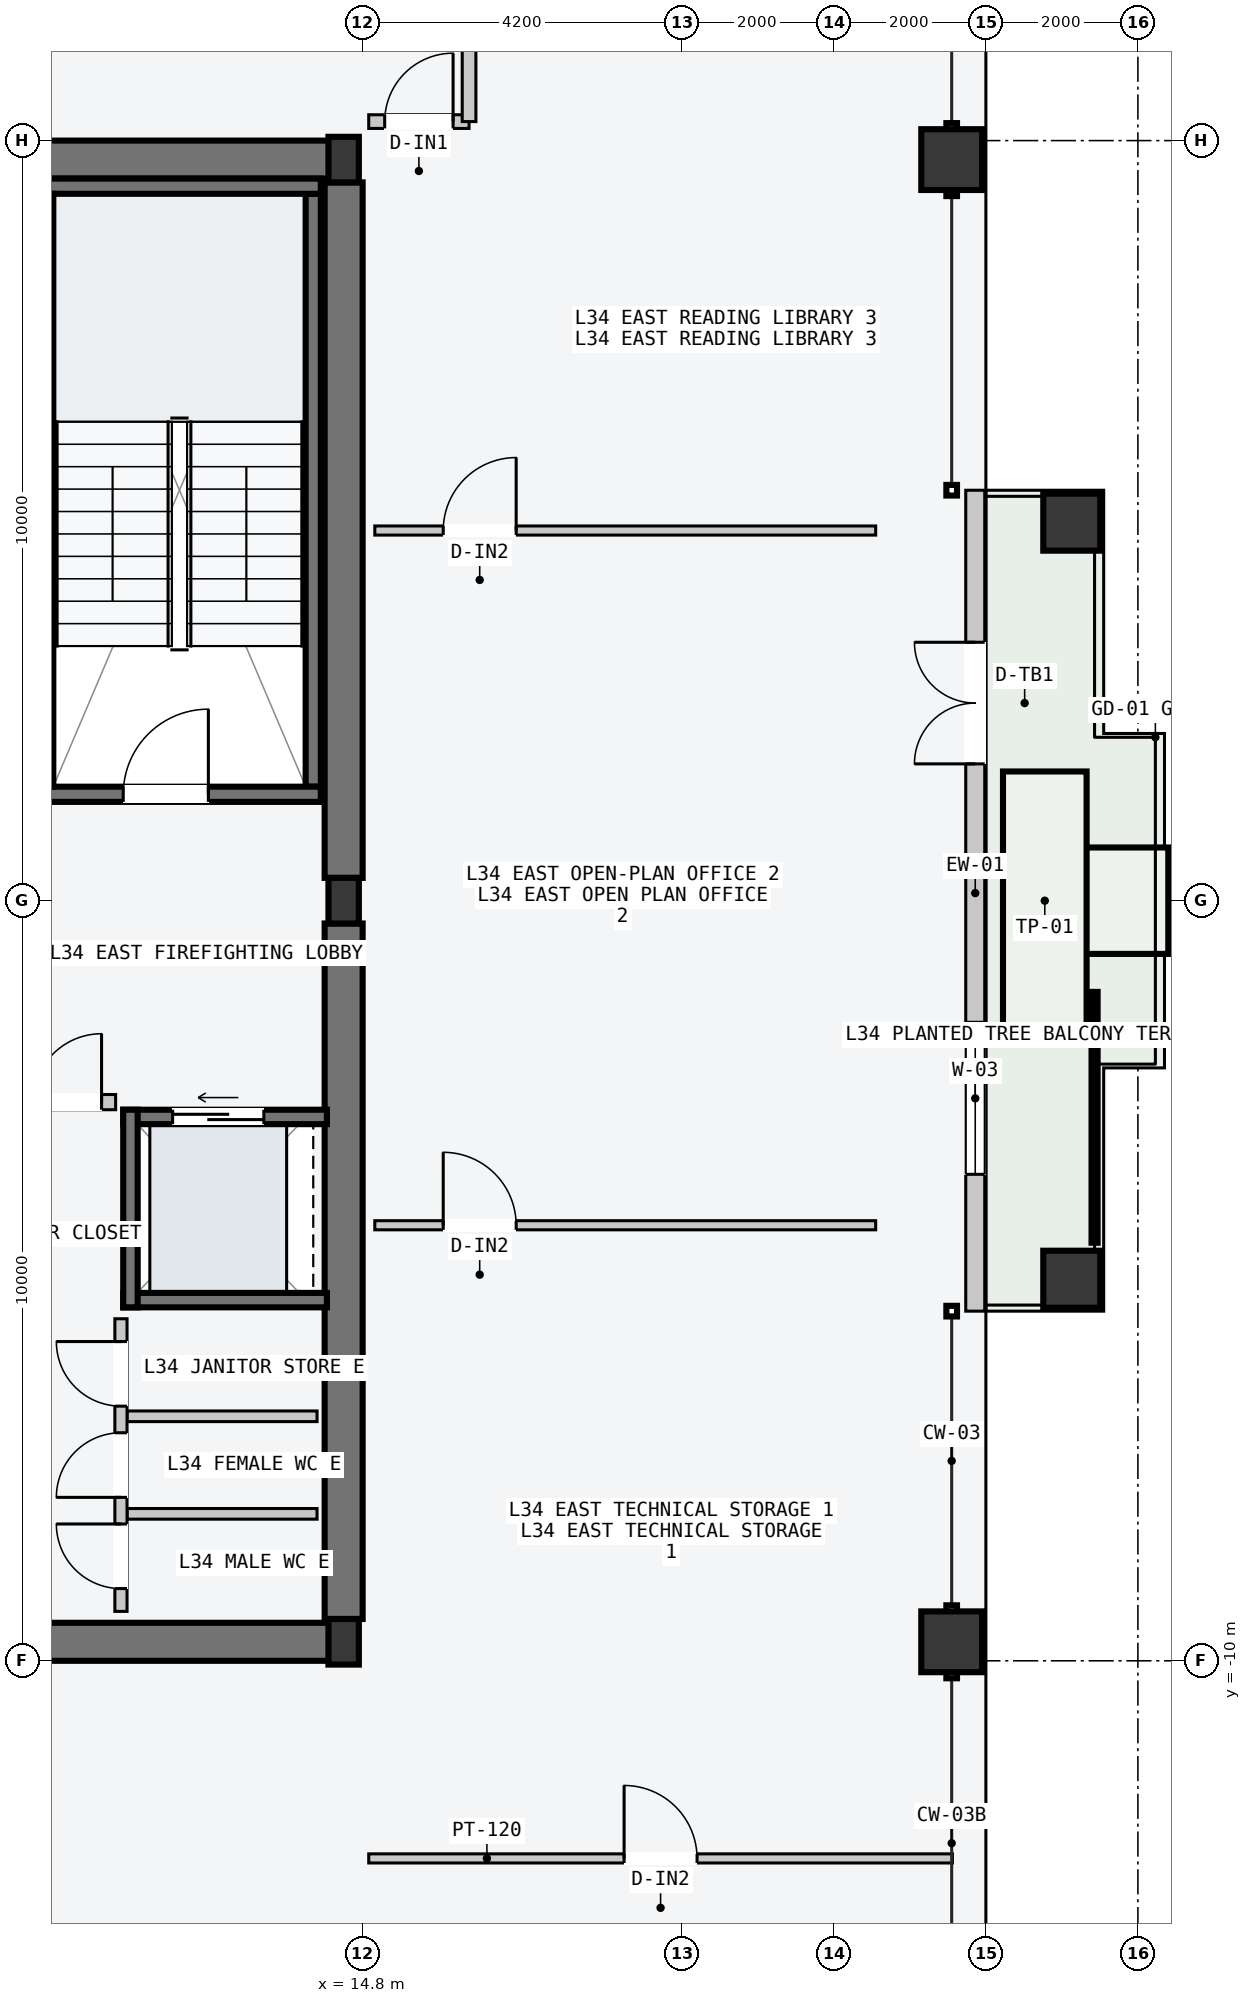
"""IFC4 building model, lengths in metres.
Left out: names, types, materials, properties, quantities, classifications, styles, units other than length and angle.
Written with IfcOpenShell. Run it as: python <this file> out.ifc"""

import sys

from ifc_helpers import new_model, si_unit, direction, frame, frame_2d, origin, origin_2d, place, context, subcontext, project, spatial, rectangle, hollow_rectangle, i_section, extrude, element, fill, save


model = new_model("IFC4")
c1 = context("Model", 3, precision=1e-05, world=origin(), true_north=direction((0.0, 1.0)))
c2 = subcontext(c1, "Body", "Model", "MODEL_VIEW")
j1 = project(units=[si_unit("LENGTHUNIT", "METRE"), si_unit("PLANEANGLEUNIT", "RADIAN")], contexts=[c1])
p1 = place(None, origin())
s1 = spatial("IfcSite", under=j1, at=p1, CompositionType="ELEMENT")
p2 = place(p1, origin())
s2 = spatial("IfcBuilding", under=s1, at=p2, CompositionType="ELEMENT")
p3 = place(p2, frame((0.0, 0.0, 131.4)))
s3 = spatial("IfcBuildingStorey", under=s2, at=p3, CompositionType="ELEMENT", Elevation=131.4)
for number, where, z_axis, x_axis in (
    (1, (8.07, -9.75, -0.2), (0.0, 0.0, 1.0), (1.0, 0.0, 0.0)),
    (2, (8.07, 9.75, -0.2), (0.0, 0.0, 1.0), (1.0, 0.0, 0.0)),
):
    element("IfcWall", number, at=place(p3, frame(where, z_axis=z_axis, x_axis=x_axis)), inside=s3, PredefinedType="SHEAR", context=c2, shape_type="SweptSolid", body=[
        extrude(rectangle(XDim=6.46, YDim=0.5, at=frame_2d((3.23, 0.0))), origin(), (0.0, 0.0, 1.0), 3.6),
    ])
for number, where, z_axis, x_axis in (
    (3, (14.55, -9.45, -0.2), (0.0, 0.0, 1.0), (0.0, 1.0, 0.0)),
    (4, (14.55, 0.3, -0.2), (0.0, 0.0, 1.0), (0.0, 1.0, 0.0)),
):
    element("IfcWall", number, at=place(p3, frame(where, z_axis=z_axis, x_axis=x_axis)), inside=s3, PredefinedType="SHEAR", context=c2, shape_type="SweptSolid", body=[
        extrude(rectangle(XDim=9.15, YDim=0.5, at=frame_2d((4.575, 0.0))), origin(), (0.0, 0.0, 1.0), 3.6),
    ])
p4 = place(p3, frame((14.15, 1.5, -0.2), z_axis=(0.0, 0.0, 1.0), x_axis=(0.0, 1.0, 0.0)))
e5 = element("IfcWall", 5, at=p4, inside=s3, PredefinedType="SOLIDWALL", context=c2, shape_type="SweptSolid", body=[
    extrude(rectangle(XDim=7.8, YDim=0.2, at=frame_2d((3.9, 0.0))), origin(), (0.0, 0.0, 1.0), 3.6),
])
p5 = place(p3, frame((10.15, 1.4, -0.2), z_axis=(0.0, 0.0, 1.0), x_axis=(1.0, 0.0, 0.0)))
e6 = element("IfcWall", 6, at=p5, inside=s3, PredefinedType="SOLIDWALL", context=c2, shape_type="SweptSolid", body=[
    extrude(rectangle(XDim=4.1, YDim=0.2, at=frame_2d((2.05, 0.0))), origin(), (0.0, 0.0, 1.0), 3.6),
])
p6 = place(p5, frame((1.5, 0.0, 0.2)))
e7 = element("IfcOpeningElement", 7, at=p6, cuts=e6, PredefinedType="OPENING", context=c2, shape_type="SweptSolid", body=[
    extrude(rectangle(XDim=1.12, YDim=2.18, at=frame_2d((0.56, 1.09))), frame((0.0, 0.11, 0.0), z_axis=(0.0, -1.0, 0.0), x_axis=(1.0, 0.0, 0.0)), (0.0, 0.0, 1.0), 0.22),
])
p7 = place(p3, frame((10.15, 9.4, -0.2), z_axis=(0.0, 0.0, 1.0), x_axis=(1.0, 0.0, 0.0)))
e8 = element("IfcWall", 8, at=p7, inside=s3, PredefinedType="SOLIDWALL", context=c2, shape_type="SweptSolid", body=[
    extrude(rectangle(XDim=4.1, YDim=0.2, at=frame_2d((2.05, 0.0))), origin(), (0.0, 0.0, 1.0), 3.6),
])
p8 = place(p3, frame((10.63, 1.5, -0.2), z_axis=(0.0, 0.0, 1.0), x_axis=(0.0, 1.0, 0.0)))
e9 = element("IfcWall", 9, at=p8, inside=s3, PredefinedType="SOLIDWALL", context=c2, shape_type="SweptSolid", body=[
    extrude(rectangle(XDim=7.8, YDim=0.2, at=frame_2d((3.9, 0.0))), origin(), (0.0, 0.0, 1.0), 3.6),
])
for number, where, z_axis, x_axis in (
    (10, (14.55, -9.75, 0.0), (0.0, 0.0, 1.0), (1.0, 0.0, 0.0)),
    (11, (14.55, 0.0, 0.0), (0.0, 0.0, 1.0), (1.0, 0.0, 0.0)),
    (12, (14.55, 9.75, 0.0), (0.0, 0.0, 1.0), (1.0, 0.0, 0.0)),
):
    element("IfcColumn", number, at=place(p3, frame(where, z_axis=z_axis, x_axis=x_axis)), inside=s3, PredefinedType="COLUMN", context=c2, shape_type="SweptSolid", body=[
        extrude(i_section(OverallWidth=0.4, OverallDepth=0.6, WebThickness=0.022, FlangeThickness=0.036, at=origin_2d()), origin(), (0.0, 0.0, 1.0), 3.6),
    ])
for number, where, z_axis, x_axis in (
    (13, (22.55, -9.75, 0.0), (0.0, 0.0, 1.0), (0.0, 1.0, 0.0)),
    (14, (22.55, 9.75, 0.0), (0.0, 0.0, 1.0), (0.0, 1.0, 0.0)),
):
    element("IfcColumn", number, at=place(p3, frame(where, z_axis=z_axis, x_axis=x_axis)), inside=s3, PredefinedType="COLUMN", context=c2, shape_type="SweptSolid", body=[
        extrude(hollow_rectangle(XDim=0.8, YDim=0.8, WallThickness=0.036, at=origin_2d()), origin(), (0.0, 0.0, 1.0), 3.6),
    ])
for number, where, z_axis, x_axis in (
    (15, (24.13, -4.98, 0.0), (0.0, 0.0, 1.0), (0.0, 1.0, 0.0)),
    (16, (24.13, 4.98, 0.0), (0.0, 0.0, 1.0), (0.0, 1.0, 0.0)),
):
    element("IfcColumn", number, at=place(p3, frame(where, z_axis=z_axis, x_axis=x_axis)), inside=s3, PredefinedType="COLUMN", context=c2, shape_type="SweptSolid", body=[
        extrude(hollow_rectangle(XDim=0.75, YDim=0.75, WallThickness=0.032, at=origin_2d()), origin(), (0.0, 0.0, 1.0), 3.6),
    ])
p9 = place(p3, frame((22.86, -5.4, 0.0), z_axis=(0.0, 0.0, 1.0), x_axis=(0.0, 1.0, 0.0)))
e17 = element("IfcWall", 17, at=p9, inside=s3, PredefinedType="STANDARD", context=c2, shape_type="SweptSolid", body=[
    extrude(rectangle(XDim=10.8, YDim=0.25, at=frame_2d((5.4, 0.0))), origin(), (0.0, 0.0, 1.0), 3.4),
])
p10 = place(p9, frame((7.2, 0.0, 0.0)))
e18 = element("IfcOpeningElement", 18, at=p10, cuts=e17, PredefinedType="OPENING", context=c2, shape_type="SweptSolid", body=[
    extrude(rectangle(XDim=1.6, YDim=2.2, at=frame_2d((0.8, 1.1))), frame((0.0, 0.135, 0.0), z_axis=(0.0, -1.0, 0.0), x_axis=(1.0, 0.0, 0.0)), (0.0, 0.0, 1.0), 0.27),
])
p11 = place(p9, frame((1.8, 0.0, 0.85)))
e19 = element("IfcOpeningElement", 19, at=p11, cuts=e17, PredefinedType="OPENING", context=c2, shape_type="SweptSolid", body=[
    extrude(rectangle(XDim=2.0, YDim=2.1, at=frame_2d((1.0, 1.05))), frame((0.0, 0.135, 0.0), z_axis=(0.0, -1.0, 0.0), x_axis=(1.0, 0.0, 0.0)), (0.0, 0.0, 1.0), 0.27),
])
p12 = place(p3, frame((11.65, -2.845, -0.2), z_axis=(0.0, 0.0, 1.0), x_axis=(1.0, 0.0, 0.0)))
e20 = element("IfcWall", 20, at=p12, inside=s3, PredefinedType="SOLIDWALL", context=c2, shape_type="SweptSolid", body=[
    extrude(rectangle(XDim=2.68, YDim=0.19, at=frame_2d((1.34, 0.0))), origin(), (0.0, 0.0, 1.0), 3.6),
])
p13 = place(p12, frame((0.65, 0.0, 0.2)))
e21 = element("IfcOpeningElement", 21, at=p13, cuts=e20, PredefinedType="OPENING", context=c2, shape_type="SweptSolid", body=[
    extrude(rectangle(XDim=1.2, YDim=2.2, at=frame_2d((0.6, 1.1))), frame((0.0, 0.105, 0.0), z_axis=(0.0, -1.0, 0.0), x_axis=(1.0, 0.0, 0.0)), (0.0, 0.0, 1.0), 0.21),
])
p14 = place(p3, frame((11.65, -5.255, -0.2), z_axis=(0.0, 0.0, 1.0), x_axis=(1.0, 0.0, 0.0)))
e22 = element("IfcWall", 22, at=p14, inside=s3, PredefinedType="SOLIDWALL", context=c2, shape_type="SweptSolid", body=[
    extrude(rectangle(XDim=2.68, YDim=0.19, at=frame_2d((1.34, 0.0))), origin(), (0.0, 0.0, 1.0), 3.6),
])
p15 = place(p3, frame((11.745, -5.35, -0.2), z_axis=(0.0, 0.0, 1.0), x_axis=(0.0, 1.0, 0.0)))
e23 = element("IfcWall", 23, at=p15, inside=s3, PredefinedType="SOLIDWALL", context=c2, shape_type="SweptSolid", body=[
    extrude(rectangle(XDim=2.6, YDim=0.19, at=frame_2d((1.3, 0.0))), origin(), (0.0, 0.0, 1.0), 3.6),
])
p16 = place(p3, frame((10.28, -2.65, 0.0), z_axis=(0.0, 0.0, 1.0), x_axis=(1.0, 0.0, 0.0)))
e24 = element("IfcWall", 24, at=p16, inside=s3, PredefinedType="PARTITIONING", context=c2, shape_type="SweptSolid", body=[
    extrude(rectangle(XDim=1.27, YDim=0.2, at=frame_2d((0.635, 0.0))), origin(), (0.0, 0.0, 1.0), 3.4),
])
p17 = place(p16, frame((0.185, 0.0, 0.0)))
e25 = element("IfcOpeningElement", 25, at=p17, cuts=e24, PredefinedType="OPENING", context=c2, shape_type="SweptSolid", body=[
    extrude(rectangle(XDim=0.9, YDim=2.15, at=frame_2d((0.45, 1.075))), frame((0.0, 0.11, 0.0), z_axis=(0.0, -1.0, 0.0), x_axis=(1.0, 0.0, 0.0)), (0.0, 0.0, 1.0), 0.22),
])
for number, where, z_axis, x_axis in (
    (26, (11.7, -8.067, 0.0), (0.0, 0.0, 1.0), (1.0, 0.0, 0.0)),
    (27, (11.7, -6.783, 0.0), (0.0, 0.0, 1.0), (1.0, 0.0, 0.0)),
):
    element("IfcWall", number, at=place(p3, frame(where, z_axis=z_axis, x_axis=x_axis)), inside=s3, PredefinedType="PARTITIONING", context=c2, shape_type="SweptSolid", body=[
        extrude(rectangle(XDim=2.5, YDim=0.14, at=frame_2d((1.25, 0.0))), origin(), (0.0, 0.0, 1.0), 3.4),
    ])
p18 = place(p3, frame((11.62, -9.35, 0.0), z_axis=(0.0, 0.0, 1.0), x_axis=(0.0, 1.0, 0.0)))
e28 = element("IfcWall", 28, at=p18, inside=s3, PredefinedType="PARTITIONING", context=c2, shape_type="SweptSolid", body=[
    extrude(rectangle(XDim=3.85, YDim=0.16, at=frame_2d((1.925, 0.0))), origin(), (0.0, 0.0, 1.0), 3.4),
])
p19 = place(p18, frame((0.3, 0.0, 0.0)))
e29 = element("IfcOpeningElement", 29, at=p19, cuts=e28, PredefinedType="OPENING", context=c2, shape_type="SweptSolid", body=[
    extrude(rectangle(XDim=0.85, YDim=2.12, at=frame_2d((0.425, 1.06))), frame((0.0, 0.09, 0.0), z_axis=(0.0, -1.0, 0.0), x_axis=(1.0, 0.0, 0.0)), (0.0, 0.0, 1.0), 0.18),
])
p20 = place(p18, frame((1.5, 0.0, 0.0)))
e30 = element("IfcOpeningElement", 30, at=p20, cuts=e28, PredefinedType="OPENING", context=c2, shape_type="SweptSolid", body=[
    extrude(rectangle(XDim=0.85, YDim=2.12, at=frame_2d((0.425, 1.06))), frame((0.0, 0.09, 0.0), z_axis=(0.0, -1.0, 0.0), x_axis=(1.0, 0.0, 0.0)), (0.0, 0.0, 1.0), 0.18),
])
p21 = place(p18, frame((2.7, 0.0, 0.0)))
e31 = element("IfcOpeningElement", 31, at=p21, cuts=e28, PredefinedType="OPENING", context=c2, shape_type="SweptSolid", body=[
    extrude(rectangle(XDim=0.85, YDim=2.12, at=frame_2d((0.425, 1.06))), frame((0.0, 0.09, 0.0), z_axis=(0.0, -1.0, 0.0), x_axis=(1.0, 0.0, 0.0)), (0.0, 0.0, 1.0), 0.18),
])
p22 = place(p3, frame((14.88, -12.6, 0.0), z_axis=(0.0, 0.0, 1.0), x_axis=(1.0, 0.0, 0.0)))
e32 = element("IfcWall", 32, at=p22, inside=s3, PredefinedType="PARTITIONING", context=c2, shape_type="SweptSolid", body=[
    extrude(rectangle(XDim=7.68, YDim=0.12, at=frame_2d((3.84, 0.0))), origin(), (0.0, 0.0, 1.0), 3.4),
])
p23 = place(p22, frame((3.36, 0.0, 0.0)))
e33 = element("IfcOpeningElement", 33, at=p23, cuts=e32, PredefinedType="OPENING", context=c2, shape_type="SweptSolid", body=[
    extrude(rectangle(XDim=0.96, YDim=2.18, at=frame_2d((0.48, 1.09))), frame((0.0, 0.07, 0.0), z_axis=(0.0, -1.0, 0.0), x_axis=(1.0, 0.0, 0.0)), (0.0, 0.0, 1.0), 0.14),
])
p24 = place(p3, frame((14.88, 10.25, 0.0), z_axis=(0.0, 0.0, 1.0), x_axis=(1.0, 0.0, 0.0)))
e34 = element("IfcWall", 34, at=p24, inside=s3, PredefinedType="PARTITIONING", context=c2, shape_type="SweptSolid", body=[
    extrude(rectangle(XDim=1.32, YDim=0.18, at=frame_2d((0.66, 0.0))), origin(), (0.0, 0.0, 1.0), 3.4),
])
p25 = place(p24, frame((0.21, 0.0, 0.0)))
e35 = element("IfcOpeningElement", 35, at=p25, cuts=e34, PredefinedType="OPENING", context=c2, shape_type="SweptSolid", body=[
    extrude(rectangle(XDim=0.9, YDim=2.15, at=frame_2d((0.45, 1.075))), frame((0.0, 0.1, 0.0), z_axis=(0.0, -1.0, 0.0), x_axis=(1.0, 0.0, 0.0)), (0.0, 0.0, 1.0), 0.2),
])
p26 = place(p3, frame((16.2, 10.25, 0.0), z_axis=(0.0, 0.0, 1.0), x_axis=(0.0, 1.0, 0.0)))
e36 = element("IfcWall", 36, at=p26, inside=s3, PredefinedType="PARTITIONING", context=c2, shape_type="SweptSolid", body=[
    extrude(rectangle(XDim=1.95, YDim=0.18, at=frame_2d((0.975, 0.0))), origin(), (0.0, 0.0, 1.0), 3.4),
])
p27 = place(p3, frame((14.96, -4.27, 0.0), z_axis=(0.0, 0.0, 1.0), x_axis=(1.0, 0.0, 0.0)))
e37 = element("IfcWall", 37, at=p27, inside=s3, PredefinedType="PARTITIONING", context=c2, shape_type="SweptSolid", body=[
    extrude(rectangle(XDim=6.59, YDim=0.12, at=frame_2d((3.295, 0.0))), origin(), (0.0, 0.0, 1.0), 3.4),
])
p28 = place(p27, frame((0.9, 0.0, 0.0)))
e38 = element("IfcOpeningElement", 38, at=p28, cuts=e37, PredefinedType="OPENING", context=c2, shape_type="SweptSolid", body=[
    extrude(rectangle(XDim=0.96, YDim=2.18, at=frame_2d((0.48, 1.09))), frame((0.0, 0.07, 0.0), z_axis=(0.0, -1.0, 0.0), x_axis=(1.0, 0.0, 0.0)), (0.0, 0.0, 1.0), 0.14),
])
p29 = place(p3, frame((14.96, 4.87, 0.0), z_axis=(0.0, 0.0, 1.0), x_axis=(1.0, 0.0, 0.0)))
e39 = element("IfcWall", 39, at=p29, inside=s3, PredefinedType="PARTITIONING", context=c2, shape_type="SweptSolid", body=[
    extrude(rectangle(XDim=6.59, YDim=0.12, at=frame_2d((3.295, 0.0))), origin(), (0.0, 0.0, 1.0), 3.4),
])
p30 = place(p29, frame((0.9, 0.0, 0.0)))
e40 = element("IfcOpeningElement", 40, at=p30, cuts=e39, PredefinedType="OPENING", context=c2, shape_type="SweptSolid", body=[
    extrude(rectangle(XDim=0.96, YDim=2.18, at=frame_2d((0.48, 1.09))), frame((0.0, 0.07, 0.0), z_axis=(0.0, -1.0, 0.0), x_axis=(1.0, 0.0, 0.0)), (0.0, 0.0, 1.0), 0.14),
])
p31 = place(p6, origin())
e41 = element("IfcDoor", 41, at=p31, inside=s3, OperationType="SINGLE_SWING_RIGHT", PredefinedType="DOOR", context=c2, shape_type="SweptSolid", body=[
    extrude(rectangle(XDim=1.12, YDim=2.18, at=frame_2d((0.56, 1.09))), frame((0.0, 0.025, 0.0), z_axis=(0.0, -1.0, 0.0), x_axis=(1.0, 0.0, 0.0)), (0.0, 0.0, 1.0), 0.05),
])
fill(e7, e41)
p32 = place(p10, origin())
e42 = element("IfcDoor", 42, at=p32, inside=s3, OperationType="DOUBLE_DOOR_SINGLE_SWING", PredefinedType="DOOR", context=c2, shape_type="SweptSolid", body=[
    extrude(rectangle(XDim=1.6, YDim=2.2, at=frame_2d((0.8, 1.1))), frame((0.0, 0.025, 0.0), z_axis=(0.0, -1.0, 0.0), x_axis=(1.0, 0.0, 0.0)), (0.0, 0.0, 1.0), 0.05),
])
fill(e18, e42)
p33 = place(p11, origin())
e43 = element("IfcWindow", 43, at=p33, inside=s3, PartitioningType="SINGLE_PANEL", PredefinedType="WINDOW", context=c2, shape_type="SweptSolid", body=[
    extrude(rectangle(XDim=2.0, YDim=2.1, at=frame_2d((1.0, 1.05))), frame((0.0, 0.03, 0.0), z_axis=(0.0, -1.0, 0.0), x_axis=(1.0, 0.0, 0.0)), (0.0, 0.0, 1.0), 0.06),
])
fill(e19, e43)
p34 = place(p13, origin())
e44 = element("IfcDoor", 44, at=p34, inside=s3, OperationType="SLIDING_TO_LEFT", PredefinedType="DOOR", context=c2, shape_type="SweptSolid", body=[
    extrude(rectangle(XDim=1.2, YDim=2.2, at=frame_2d((0.6, 1.1))), frame((0.0, 0.025, 0.0), z_axis=(0.0, -1.0, 0.0), x_axis=(1.0, 0.0, 0.0)), (0.0, 0.0, 1.0), 0.05),
])
fill(e21, e44)
p35 = place(p17, origin())
e45 = element("IfcDoor", 45, at=p35, inside=s3, OperationType="SINGLE_SWING_RIGHT", PredefinedType="DOOR", context=c2, shape_type="SweptSolid", body=[
    extrude(rectangle(XDim=0.9, YDim=2.15, at=frame_2d((0.45, 1.075))), frame((0.0, 0.025, 0.0), z_axis=(0.0, -1.0, 0.0), x_axis=(1.0, 0.0, 0.0)), (0.0, 0.0, 1.0), 0.05),
])
fill(e25, e45)
p36 = place(p19, origin())
e46 = element("IfcDoor", 46, at=p36, inside=s3, OperationType="SINGLE_SWING_RIGHT", PredefinedType="DOOR", context=c2, shape_type="SweptSolid", body=[
    extrude(rectangle(XDim=0.85, YDim=2.12, at=frame_2d((0.425, 1.06))), frame((0.0, 0.025, 0.0), z_axis=(0.0, -1.0, 0.0), x_axis=(1.0, 0.0, 0.0)), (0.0, 0.0, 1.0), 0.05),
])
fill(e29, e46)
p37 = place(p20, origin())
e47 = element("IfcDoor", 47, at=p37, inside=s3, OperationType="SINGLE_SWING_LEFT", PredefinedType="DOOR", context=c2, shape_type="SweptSolid", body=[
    extrude(rectangle(XDim=0.85, YDim=2.12, at=frame_2d((0.425, 1.06))), frame((0.0, 0.025, 0.0), z_axis=(0.0, -1.0, 0.0), x_axis=(1.0, 0.0, 0.0)), (0.0, 0.0, 1.0), 0.05),
])
fill(e30, e47)
p38 = place(p21, origin())
e48 = element("IfcDoor", 48, at=p38, inside=s3, OperationType="SINGLE_SWING_RIGHT", PredefinedType="DOOR", context=c2, shape_type="SweptSolid", body=[
    extrude(rectangle(XDim=0.85, YDim=2.12, at=frame_2d((0.425, 1.06))), frame((0.0, 0.025, 0.0), z_axis=(0.0, -1.0, 0.0), x_axis=(1.0, 0.0, 0.0)), (0.0, 0.0, 1.0), 0.05),
])
fill(e31, e48)
p39 = place(p23, origin())
e49 = element("IfcDoor", 49, at=p39, inside=s3, OperationType="SINGLE_SWING_LEFT", PredefinedType="DOOR", context=c2, shape_type="SweptSolid", body=[
    extrude(rectangle(XDim=0.96, YDim=2.18, at=frame_2d((0.48, 1.09))), frame((0.0, 0.025, 0.0), z_axis=(0.0, -1.0, 0.0), x_axis=(1.0, 0.0, 0.0)), (0.0, 0.0, 1.0), 0.05),
])
fill(e33, e49)
p40 = place(p25, origin())
e50 = element("IfcDoor", 50, at=p40, inside=s3, OperationType="SINGLE_SWING_RIGHT", PredefinedType="DOOR", context=c2, shape_type="SweptSolid", body=[
    extrude(rectangle(XDim=0.9, YDim=2.15, at=frame_2d((0.45, 1.075))), frame((0.0, 0.025, 0.0), z_axis=(0.0, -1.0, 0.0), x_axis=(1.0, 0.0, 0.0)), (0.0, 0.0, 1.0), 0.05),
])
fill(e35, e50)
p41 = place(p28, origin())
e51 = element("IfcDoor", 51, at=p41, inside=s3, OperationType="SINGLE_SWING_LEFT", PredefinedType="DOOR", context=c2, shape_type="SweptSolid", body=[
    extrude(rectangle(XDim=0.96, YDim=2.18, at=frame_2d((0.48, 1.09))), frame((0.0, 0.025, 0.0), z_axis=(0.0, -1.0, 0.0), x_axis=(1.0, 0.0, 0.0)), (0.0, 0.0, 1.0), 0.05),
])
fill(e38, e51)
p42 = place(p30, origin())
e52 = element("IfcDoor", 52, at=p42, inside=s3, OperationType="SINGLE_SWING_RIGHT", PredefinedType="DOOR", context=c2, shape_type="SweptSolid", body=[
    extrude(rectangle(XDim=0.96, YDim=2.18, at=frame_2d((0.48, 1.09))), frame((0.0, 0.025, 0.0), z_axis=(0.0, -1.0, 0.0), x_axis=(1.0, 0.0, 0.0)), (0.0, 0.0, 1.0), 0.05),
])
fill(e40, e52)
save(model, sys.argv[1])
